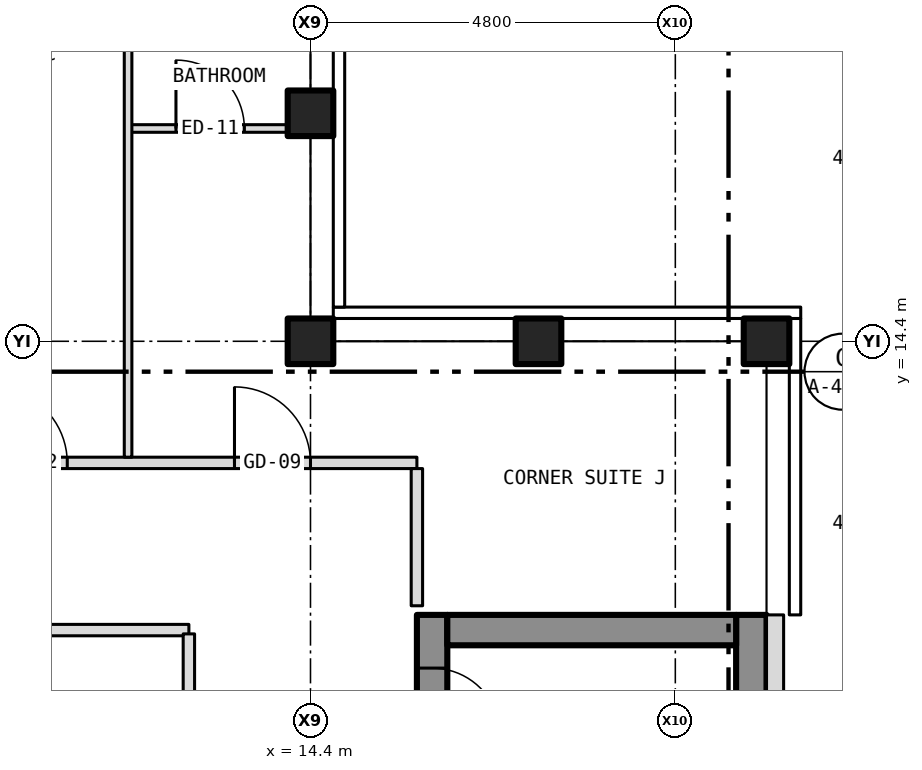
"""IFC4 building model, lengths in metres.
Left out: names, types, materials, properties, quantities, classifications, styles, units other than length and angle.
Written with IfcOpenShell. Run it as: python <this file> out.ifc"""

import sys

from ifc_helpers import new_model, si_unit, direction, frame, frame_2d, origin, origin_2d, place, context, subcontext, project, spatial, rectangle, hollow_rectangle, extrude, element, fill, save


model = new_model("IFC4")
c1 = context("Model", 3, precision=1e-05, world=origin(), true_north=direction((0.0, 1.0)))
c2 = subcontext(c1, "Body", "Model", "MODEL_VIEW")
j1 = project(units=[si_unit("LENGTHUNIT", "METRE"), si_unit("PLANEANGLEUNIT", "RADIAN")], contexts=[c1])
p1 = place(None, origin())
s1 = spatial("IfcSite", under=j1, at=p1, CompositionType="ELEMENT")
p2 = place(p1, origin())
s2 = spatial("IfcBuilding", under=s1, at=p2, CompositionType="ELEMENT")
p3 = place(p2, frame((0.0, 0.0, 248.0)))
s3 = spatial("IfcBuildingStorey", under=s2, at=p3, CompositionType="ELEMENT", Elevation=248.0)
for number, where, z_axis, x_axis in (
    (1, (20.4, 14.4, -0.15), (0.0, 0.0, 1.0), (1.0, 0.0, 0.0)),
    (2, (14.4, 14.4, -0.15), (0.0, 0.0, 1.0), (1.0, 0.0, 0.0)),
    (3, (14.4, 17.4, -0.15), (0.0, 0.0, 1.0), (1.0, 0.0, 0.0)),
    (4, (17.4, 14.4, -0.15), (0.0, 0.0, 1.0), (1.0, 0.0, 0.0)),
):
    element("IfcColumn", number, at=place(p3, frame(where, z_axis=z_axis, x_axis=x_axis)), inside=s3, PredefinedType="COLUMN", context=c2, shape_type="SweptSolid", body=[
        extrude(hollow_rectangle(XDim=0.6, YDim=0.6, WallThickness=0.03, at=origin_2d()), origin(), (0.0, 0.0, 1.0), 3.5),
    ])
p4 = place(p3, frame((16.0, -10.8, 0.0), z_axis=(0.0, 0.0, 1.0), x_axis=(0.0, 1.0, 0.0)))
e5 = element("IfcWall", 5, at=p4, inside=s3, PredefinedType="SHEAR", context=c2, shape_type="SweptSolid", body=[
    extrude(rectangle(XDim=21.6, YDim=0.4, at=frame_2d((10.8, 0.0))), origin(), (0.0, 0.0, 1.0), 3.25),
])
p5 = place(p4, frame((9.4, 0.0, 0.0)))
e6 = element("IfcOpeningElement", 6, at=p5, cuts=e5, PredefinedType="OPENING", context=c2, shape_type="SweptSolid", body=[
    extrude(rectangle(XDim=1.1, YDim=2.1, at=frame_2d((0.55, 1.05))), frame((0.0, 0.212, 0.0), z_axis=(0.0, -1.0, 0.0), x_axis=(1.0, 0.0, 0.0)), (0.0, 0.0, 1.0), 0.424),
])
p6 = place(p4, frame((11.5, 0.0, 0.0)))
e7 = element("IfcOpeningElement", 7, at=p6, cuts=e5, PredefinedType="OPENING", context=c2, shape_type="SweptSolid", body=[
    extrude(rectangle(XDim=1.1, YDim=2.1, at=frame_2d((0.55, 1.05))), frame((0.0, 0.212, 0.0), z_axis=(0.0, -1.0, 0.0), x_axis=(1.0, 0.0, 0.0)), (0.0, 0.0, 1.0), 0.424),
])
p7 = place(p4, frame((13.6, 0.0, 0.0)))
e8 = element("IfcOpeningElement", 8, at=p7, cuts=e5, PredefinedType="OPENING", context=c2, shape_type="SweptSolid", body=[
    extrude(rectangle(XDim=1.1, YDim=2.1, at=frame_2d((0.55, 1.05))), frame((0.0, 0.212, 0.0), z_axis=(0.0, -1.0, 0.0), x_axis=(1.0, 0.0, 0.0)), (0.0, 0.0, 1.0), 0.424),
])
p8 = place(p4, frame((15.7, 0.0, 0.0)))
e9 = element("IfcOpeningElement", 9, at=p8, cuts=e5, PredefinedType="OPENING", context=c2, shape_type="SweptSolid", body=[
    extrude(rectangle(XDim=1.1, YDim=2.1, at=frame_2d((0.55, 1.05))), frame((0.0, 0.212, 0.0), z_axis=(0.0, -1.0, 0.0), x_axis=(1.0, 0.0, 0.0)), (0.0, 0.0, 1.0), 0.424),
])
p9 = place(p4, frame((17.8, 0.0, 0.0)))
e10 = element("IfcOpeningElement", 10, at=p9, cuts=e5, PredefinedType="OPENING", context=c2, shape_type="SweptSolid", body=[
    extrude(rectangle(XDim=1.1, YDim=2.1, at=frame_2d((0.55, 1.05))), frame((0.0, 0.212, 0.0), z_axis=(0.0, -1.0, 0.0), x_axis=(1.0, 0.0, 0.0)), (0.0, 0.0, 1.0), 0.424),
])
p10 = place(p4, frame((5.642, 0.0, 0.0)))
e11 = element("IfcOpeningElement", 11, at=p10, cuts=e5, PredefinedType="OPENING", context=c2, shape_type="SweptSolid", body=[
    extrude(rectangle(XDim=1.1, YDim=2.1, at=frame_2d((0.55, 1.05))), frame((0.0, 0.212, 0.0), z_axis=(0.0, -1.0, 0.0), x_axis=(1.0, 0.0, 0.0)), (0.0, 0.0, 1.0), 0.424),
])
p11 = place(p4, frame((7.5, 0.0, 0.0)))
e12 = element("IfcOpeningElement", 12, at=p11, cuts=e5, PredefinedType="OPENING", context=c2, shape_type="SweptSolid", body=[
    extrude(rectangle(XDim=1.1, YDim=2.1, at=frame_2d((0.55, 1.05))), frame((0.0, 0.212, 0.0), z_axis=(0.0, -1.0, 0.0), x_axis=(1.0, 0.0, 0.0)), (0.0, 0.0, 1.0), 0.424),
])
p12 = place(p4, frame((20.0, 0.0, 0.0)))
e13 = element("IfcOpeningElement", 13, at=p12, cuts=e5, PredefinedType="OPENING", context=c2, shape_type="SweptSolid", body=[
    extrude(rectangle(XDim=0.9, YDim=2.1, at=frame_2d((0.45, 1.05))), frame((0.0, 0.212, 0.0), z_axis=(0.0, -1.0, 0.0), x_axis=(1.0, 0.0, 0.0)), (0.0, 0.0, 1.0), 0.424),
])
p13 = place(p3, frame((20.2, -10.8, 0.0), z_axis=(0.0, 0.0, 1.0), x_axis=(0.0, 1.0, 0.0)))
e14 = element("IfcWall", 14, at=p13, inside=s3, PredefinedType="SHEAR", context=c2, shape_type="SweptSolid", body=[
    extrude(rectangle(XDim=21.6, YDim=0.4, at=frame_2d((10.8, 0.0))), origin(), (0.0, 0.0, 1.0), 3.25),
])
p14 = place(p3, frame((16.2, 10.6, 0.0), z_axis=(0.0, 0.0, 1.0), x_axis=(1.0, 0.0, 0.0)))
e15 = element("IfcWall", 15, at=p14, inside=s3, PredefinedType="SHEAR", context=c2, shape_type="SweptSolid", body=[
    extrude(rectangle(XDim=3.8, YDim=0.4, at=frame_2d((1.9, 0.0))), origin(), (0.0, 0.0, 1.0), 3.25),
])
p15 = place(p3, frame((20.512, -10.8, 0.0), z_axis=(0.0, 0.0, 1.0), x_axis=(0.0, 1.0, 0.0)))
e16 = element("IfcWall", 16, at=p15, inside=s3, PredefinedType="SOLIDWALL", context=c2, shape_type="SweptSolid", body=[
    extrude(rectangle(XDim=21.6, YDim=0.225, at=frame_2d((10.8, 0.0))), origin(), (0.0, 0.0, 1.0), 3.5),
])
p16 = place(p15, frame((2.95, 0.0, 1.0)))
e17 = element("IfcOpeningElement", 17, at=p16, cuts=e16, PredefinedType="OPENING", context=c2, shape_type="SweptSolid", body=[
    extrude(rectangle(XDim=0.6, YDim=1.5, at=frame_2d((0.3, 0.75))), frame((0.0, 0.125, 0.0), z_axis=(0.0, -1.0, 0.0), x_axis=(1.0, 0.0, 0.0)), (0.0, 0.0, 1.0), 0.249),
])
p17 = place(p3, frame((9.7, 10.6, 0.0), z_axis=(0.0, 0.0, 1.0), x_axis=(1.0, 0.0, 0.0)))
e18 = element("IfcWall", 18, at=p17, inside=s3, PredefinedType="PARTITIONING", context=c2, shape_type="SweptSolid", body=[
    extrude(rectangle(XDim=3.1, YDim=0.15, at=frame_2d((1.55, 0.0))), origin(), (0.0, 0.0, 1.0), 3.35),
])
p18 = place(p3, frame((-15.8, 12.8, 0.0), z_axis=(0.0, 0.0, 1.0), x_axis=(1.0, 0.0, 0.0)))
e19 = element("IfcWall", 19, at=p18, inside=s3, PredefinedType="PARTITIONING", context=c2, shape_type="SweptSolid", body=[
    extrude(rectangle(XDim=31.6, YDim=0.15, at=frame_2d((15.8, 0.0))), origin(), (0.0, 0.0, 1.0), 3.35),
])
p19 = place(p18, frame((6.8, 0.0, 0.0)))
e20 = element("IfcOpeningElement", 20, at=p19, cuts=e19, PredefinedType="OPENING", context=c2, shape_type="SweptSolid", body=[
    extrude(rectangle(XDim=1.0, YDim=2.1, at=frame_2d((0.5, 1.05))), frame((0.0, 0.087, 0.0), z_axis=(0.0, -1.0, 0.0), x_axis=(1.0, 0.0, 0.0)), (0.0, 0.0, 1.0), 0.174),
])
p20 = place(p18, frame((15.35, 0.0, 0.0)))
e21 = element("IfcOpeningElement", 21, at=p20, cuts=e19, PredefinedType="OPENING", context=c2, shape_type="SweptSolid", body=[
    extrude(rectangle(XDim=0.9, YDim=2.1, at=frame_2d((0.45, 1.05))), frame((0.0, 0.087, 0.0), z_axis=(0.0, -1.0, 0.0), x_axis=(1.0, 0.0, 0.0)), (0.0, 0.0, 1.0), 0.174),
])
p21 = place(p18, frame((26.0, 0.0, 0.0)))
e22 = element("IfcOpeningElement", 22, at=p21, cuts=e19, PredefinedType="OPENING", context=c2, shape_type="SweptSolid", body=[
    extrude(rectangle(XDim=1.0, YDim=2.1, at=frame_2d((0.5, 1.05))), frame((0.0, 0.087, 0.0), z_axis=(0.0, -1.0, 0.0), x_axis=(1.0, 0.0, 0.0)), (0.0, 0.0, 1.0), 0.174),
])
p22 = place(p18, frame((1.4, 0.0, 0.0)))
e23 = element("IfcOpeningElement", 23, at=p22, cuts=e19, PredefinedType="OPENING", context=c2, shape_type="SweptSolid", body=[
    extrude(rectangle(XDim=1.0, YDim=2.1, at=frame_2d((0.5, 1.05))), frame((0.0, 0.087, 0.0), z_axis=(0.0, -1.0, 0.0), x_axis=(1.0, 0.0, 0.0)), (0.0, 0.0, 1.0), 0.174),
])
p23 = place(p18, frame((29.2, 0.0, 0.0)))
e24 = element("IfcOpeningElement", 24, at=p23, cuts=e19, PredefinedType="OPENING", context=c2, shape_type="SweptSolid", body=[
    extrude(rectangle(XDim=1.0, YDim=2.1, at=frame_2d((0.5, 1.05))), frame((0.0, 0.087, 0.0), z_axis=(0.0, -1.0, 0.0), x_axis=(1.0, 0.0, 0.0)), (0.0, 0.0, 1.0), 0.174),
])
p24 = place(p3, frame((12.0, 17.2, 0.0), z_axis=(0.0, 0.0, 1.0), x_axis=(1.0, 0.0, 0.0)))
e25 = element("IfcWall", 25, at=p24, inside=s3, PredefinedType="PARTITIONING", context=c2, shape_type="SweptSolid", body=[
    extrude(rectangle(XDim=2.28, YDim=0.1, at=frame_2d((1.14, 0.0))), origin(), (0.0, 0.0, 1.0), 3.35),
])
p25 = place(p24, frame((0.63, 0.0, 0.0)))
e26 = element("IfcOpeningElement", 26, at=p25, cuts=e25, PredefinedType="OPENING", context=c2, shape_type="SweptSolid", body=[
    extrude(rectangle(XDim=0.9, YDim=2.1, at=frame_2d((0.45, 1.05))), frame((0.0, 0.062, 0.0), z_axis=(0.0, -1.0, 0.0), x_axis=(1.0, 0.0, 0.0)), (0.0, 0.0, 1.0), 0.124),
])
p26 = place(p3, frame((12.0, 12.875, 0.0), z_axis=(0.0, 0.0, 1.0), x_axis=(0.0, 1.0, 0.0)))
e27 = element("IfcWall", 27, at=p26, inside=s3, PredefinedType="PARTITIONING", context=c2, shape_type="SweptSolid", body=[
    extrude(rectangle(XDim=7.855, YDim=0.1, at=frame_2d((3.927, 0.0))), origin(), (0.0, 0.0, 1.0), 3.35),
])
p27 = place(p3, frame((12.8, 3.375, 0.0), z_axis=(0.0, 0.0, 1.0), x_axis=(0.0, 1.0, 0.0)))
e28 = element("IfcWall", 28, at=p27, inside=s3, PredefinedType="PARTITIONING", context=c2, shape_type="SweptSolid", body=[
    extrude(rectangle(XDim=7.175, YDim=0.15, at=frame_2d((3.587, 0.0))), origin(), (0.0, 0.0, 1.0), 3.35),
])
p28 = place(p3, frame((15.8, 10.92, 0.0), z_axis=(0.0, 0.0, 1.0), x_axis=(0.0, 1.0, 0.0)))
e29 = element("IfcWall", 29, at=p28, inside=s3, PredefinedType="PARTITIONING", context=c2, shape_type="SweptSolid", body=[
    extrude(rectangle(XDim=1.805, YDim=0.15, at=frame_2d((0.903, 0.0))), origin(), (0.0, 0.0, 1.0), 3.35),
])
p29 = place(p12, origin())
e30 = element("IfcDoor", 30, at=p29, inside=s3, OperationType="SINGLE_SWING_LEFT", PredefinedType="DOOR", context=c2, shape_type="SweptSolid", body=[
    extrude(rectangle(XDim=0.9, YDim=2.1, at=frame_2d((0.45, 1.05))), frame((0.0, 0.025, 0.0), z_axis=(0.0, -1.0, 0.0), x_axis=(1.0, 0.0, 0.0)), (0.0, 0.0, 1.0), 0.05),
])
fill(e13, e30)
p30 = place(p21, origin())
e31 = element("IfcDoor", 31, at=p30, inside=s3, OperationType="SINGLE_SWING_LEFT", PredefinedType="DOOR", context=c2, shape_type="SweptSolid", body=[
    extrude(rectangle(XDim=1.0, YDim=2.1, at=frame_2d((0.5, 1.05))), frame((0.0, 0.025, 0.0), z_axis=(0.0, -1.0, 0.0), x_axis=(1.0, 0.0, 0.0)), (0.0, 0.0, 1.0), 0.05),
])
fill(e22, e31)
p31 = place(p25, origin())
e32 = element("IfcDoor", 32, at=p31, inside=s3, OperationType="SINGLE_SWING_LEFT", PredefinedType="DOOR", context=c2, shape_type="SweptSolid", body=[
    extrude(rectangle(XDim=0.9, YDim=2.1, at=frame_2d((0.45, 1.05))), frame((0.0, 0.025, 0.0), z_axis=(0.0, -1.0, 0.0), x_axis=(1.0, 0.0, 0.0)), (0.0, 0.0, 1.0), 0.05),
])
fill(e26, e32)
p32 = place(p23, origin())
e33 = element("IfcDoor", 33, at=p32, inside=s3, OperationType="SINGLE_SWING_LEFT", PredefinedType="DOOR", context=c2, shape_type="SweptSolid", body=[
    extrude(rectangle(XDim=1.0, YDim=2.1, at=frame_2d((0.5, 1.05))), frame((0.0, 0.025, 0.0), z_axis=(0.0, -1.0, 0.0), x_axis=(1.0, 0.0, 0.0)), (0.0, 0.0, 1.0), 0.05),
])
fill(e24, e33)
save(model, sys.argv[1])
